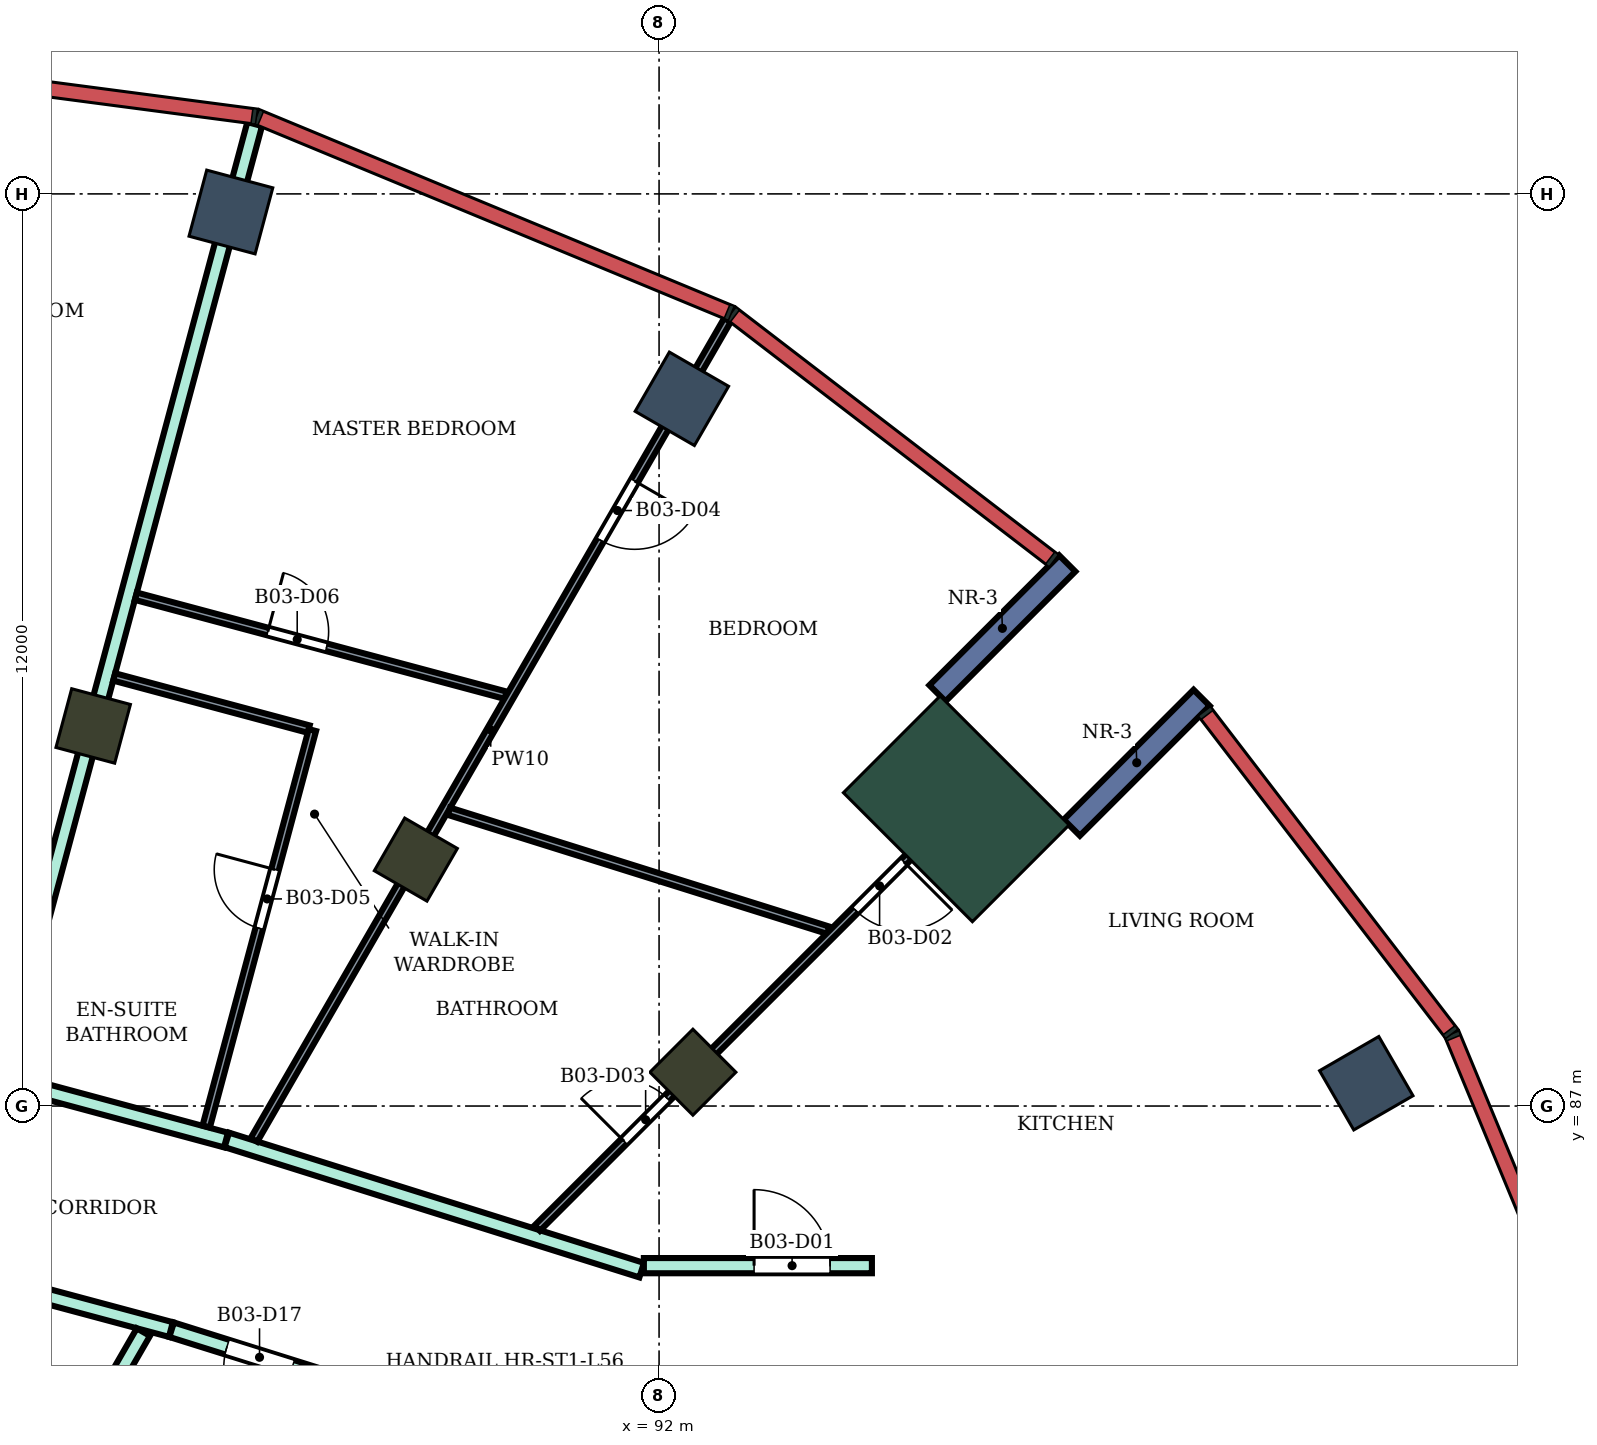
"""IFC4 building model, lengths in metres.
Left out: names, types, materials, properties, quantities, classifications, styles, units other than length and angle.
Written with IfcOpenShell. Run it as: python <this file> out.ifc"""

import sys

from ifc_helpers import new_model, si_unit, direction, frame, frame_2d, origin, origin_2d, place, context, subcontext, project, spatial, rectangle, extrude, element, fill, save


model = new_model("IFC4")
c1 = context("Model", 3, precision=1e-05, world=origin(), true_north=direction((0.0, 1.0)))
c2 = subcontext(c1, "Body", "Model", "MODEL_VIEW")
j1 = project(units=[si_unit("LENGTHUNIT", "METRE"), si_unit("PLANEANGLEUNIT", "RADIAN")], contexts=[c1])
p1 = place(None, origin())
s1 = spatial("IfcSite", under=j1, at=p1, CompositionType="ELEMENT")
p2 = place(p1, origin())
s2 = spatial("IfcBuilding", under=s1, at=p2, CompositionType="ELEMENT")
p3 = place(p2, frame((0.0, 0.0, 245.7)))
s3 = spatial("IfcBuildingStorey", under=s2, at=p3, CompositionType="ELEMENT", Elevation=245.7)
for number, where, z_axis, x_axis in (
    (1, (101.304, 87.3, 0.0), (0.0, 0.0, 1.0), (0.866, 0.5, 0.0)),
    (2, (92.3, 96.304, 0.0), (0.0, 0.0, 1.0), (0.5, 0.866, 0.0)),
    (3, (86.367, 98.762, 0.0), (0.0, 0.0, 1.0), (0.259, 0.966, 0.0)),
):
    element("IfcColumn", number, at=place(p3, frame(where, z_axis=z_axis, x_axis=x_axis)), inside=s3, PredefinedType="COLUMN", context=c2, shape_type="SweptSolid", body=[
        extrude(rectangle(XDim=0.9, YDim=0.9, at=origin_2d()), origin(), (0.0, 0.0, 1.0), 4.2),
    ])
for number, where, z_axis, x_axis in (
    (4, (92.445, 87.445, 0.0), (0.0, 0.0, 1.0), (0.707, 0.707, 0.0)),
    (5, (88.8, 90.242, 0.0), (0.0, 0.0, 1.0), (0.5, 0.866, 0.0)),
    (6, (84.555, 92.0, 0.0), (0.0, 0.0, 1.0), (0.259, 0.966, 0.0)),
):
    element("IfcColumn", number, at=place(p3, frame(where, z_axis=z_axis, x_axis=x_axis)), inside=s3, PredefinedType="COLUMN", context=c2, shape_type="SweptSolid", body=[
        extrude(rectangle(XDim=0.8, YDim=0.8, at=origin_2d()), origin(), (0.0, 0.0, 1.0), 4.2),
    ])
p4 = place(p3, frame((95.91, 90.91, 0.0), z_axis=(0.0, 0.0, 1.0), x_axis=(0.707106781187, 0.707106781187, 0.0)))
e7 = element("IfcColumn", 7, at=p4, inside=s3, PredefinedType="COLUMN", context=c2, shape_type="SweptSolid", body=[
    extrude(rectangle(XDim=1.8, YDim=2.4, at=origin_2d()), origin(), (0.0, 0.0, 1.0), 4.2),
])
for number, where, z_axis, x_axis in (
    (8, (97.43, 90.662, 0.0), (0.0, 0.0, 1.0), (0.707, 0.707, 0.0)),
    (9, (95.662, 92.43, 0.0), (0.0, 0.0, 1.0), (0.707, 0.707, 0.0)),
):
    element("IfcWall", number, at=place(p3, frame(where, z_axis=z_axis, x_axis=x_axis)), inside=s3, PredefinedType="NOTDEFINED", context=c2, shape_type="SweptSolid", body=[
        extrude(rectangle(XDim=2.416, YDim=0.3, at=frame_2d((1.208, 0.0))), origin(), (0.0, 0.0, 1.0), 4.2),
    ])
p5 = place(p3, frame((80.0, 85.554, 0.0), z_axis=(0.0, 0.0, 1.0), x_axis=(0.965928989968, -0.258807237802, 0.0)))
e10 = element("IfcWall", 10, at=p5, inside=s3, PredefinedType="PARTITIONING", context=c2, shape_type="SweptSolid", body=[
    extrude(rectangle(XDim=5.774, YDim=0.2, at=frame_2d((2.887, 0.0))), origin(), (0.0, 0.0, 1.0), 3.75),
])
p6 = place(p5, frame((2.292, 0.0, 0.0)))
e11 = element("IfcOpeningElement", 11, at=p6, cuts=e10, PredefinedType="OPENING", context=c2, shape_type="SweptSolid", body=[
    extrude(rectangle(XDim=0.9, YDim=2.1, at=frame_2d((0.45, 1.05))), frame((0.0, 0.11, 0.0), z_axis=(0.0, -1.0, 0.0), x_axis=(1.0, 0.0, 0.0)), (0.0, 0.0, 1.0), 0.22),
])
p7 = place(p3, frame((80.049, 88.237, 0.0), z_axis=(0.0, 0.0, 1.0), x_axis=(0.965582990495, -0.260095152718, 0.0)))
e12 = element("IfcWall", 12, at=p7, inside=s3, PredefinedType="PARTITIONING", context=c2, shape_type="SweptSolid", body=[
    extrude(rectangle(XDim=6.476, YDim=0.2, at=frame_2d((3.238, 0.0))), origin(), (0.0, 0.0, 1.0), 3.75),
])
p8 = place(p7, frame((0.5, 0.0, 0.0)))
e13 = element("IfcOpeningElement", 13, at=p8, cuts=e12, PredefinedType="OPENING", context=c2, shape_type="SweptSolid", body=[
    extrude(rectangle(XDim=1.0, YDim=2.1, at=frame_2d((0.5, 1.05))), frame((0.0, 0.11, 0.0), z_axis=(0.0, -1.0, 0.0), x_axis=(1.0, 0.0, 0.0)), (0.0, 0.0, 1.0), 0.22),
])
p9 = place(p3, frame((83.335, 87.456, 0.0), z_axis=(0.0, 0.0, 1.0), x_axis=(0.259184958139, 0.965827705895, 0.0)))
e14 = element("IfcWall", 14, at=p9, inside=s3, PredefinedType="PARTITIONING", context=c2, shape_type="SweptSolid", body=[
    extrude(rectangle(XDim=12.904, YDim=0.2, at=frame_2d((6.452, 0.0))), origin(), (0.0, 0.0, 1.0), 3.75),
])
p10 = place(p3, frame((83.852, 81.665, 0.0), z_axis=(0.0, 0.0, 1.0), x_axis=(0.500185068774, 0.865918527909, 0.0)))
e15 = element("IfcWall", 15, at=p10, inside=s3, PredefinedType="PARTITIONING", context=c2, shape_type="SweptSolid", body=[
    extrude(rectangle(XDim=2.726, YDim=0.2, at=frame_2d((1.363, 0.0))), origin(), (0.0, 0.0, 1.0), 3.75),
])
p11 = place(p3, frame((85.587, 84.057, 0.0), z_axis=(0.0, 0.0, 1.0), x_axis=(0.954239513179, -0.299043393987, 0.0)))
e16 = element("IfcWall", 16, at=p11, inside=s3, PredefinedType="PARTITIONING", context=c2, shape_type="SweptSolid", body=[
    extrude(rectangle(XDim=2.424, YDim=0.2, at=frame_2d((1.212, 0.0))), origin(), (0.0, 0.0, 1.0), 3.75),
])
p12 = place(p11, frame((0.762, 0.0, 0.0)))
e17 = element("IfcOpeningElement", 17, at=p12, cuts=e16, PredefinedType="OPENING", context=c2, shape_type="SweptSolid", body=[
    extrude(rectangle(XDim=0.9, YDim=2.1, at=frame_2d((0.45, 1.05))), frame((0.0, 0.11, 0.0), z_axis=(0.0, -1.0, 0.0), x_axis=(1.0, 0.0, 0.0)), (0.0, 0.0, 1.0), 0.22),
])
p13 = place(p3, frame((86.313, 86.554, 0.0), z_axis=(0.0, 0.0, 1.0), x_axis=(0.954081217458, -0.299548043717, 0.0)))
e18 = element("IfcWall", 18, at=p13, inside=s3, PredefinedType="PARTITIONING", context=c2, shape_type="SweptSolid", body=[
    extrude(rectangle(XDim=5.721, YDim=0.2, at=frame_2d((2.86, 0.0))), origin(), (0.0, 0.0, 1.0), 3.75),
])
p14 = place(p3, frame((91.8, 84.9, 0.0), z_axis=(0.0, 0.0, 1.0), x_axis=(1.0, 0.0, 0.0)))
e19 = element("IfcWall", 19, at=p14, inside=s3, PredefinedType="PARTITIONING", context=c2, shape_type="SweptSolid", body=[
    extrude(rectangle(XDim=3.0, YDim=0.2, at=frame_2d((1.5, 0.0))), origin(), (0.0, 0.0, 1.0), 3.75),
])
p15 = place(p14, frame((1.45, 0.0, 0.0)))
e20 = element("IfcOpeningElement", 20, at=p15, cuts=e19, PredefinedType="OPENING", context=c2, shape_type="SweptSolid", body=[
    extrude(rectangle(XDim=1.0, YDim=2.1, at=frame_2d((0.5, 1.05))), frame((0.0, 0.11, 0.0), z_axis=(0.0, -1.0, 0.0), x_axis=(1.0, 0.0, 0.0)), (0.0, 0.0, 1.0), 0.22),
])
p16 = place(p3, frame((84.831, 92.645, 0.0), z_axis=(0.0, 0.0, 1.0), x_axis=(0.965900745566, -0.258912629499, 0.0)))
e21 = element("IfcWall", 21, at=p16, inside=s3, PredefinedType="PARTITIONING", context=c2, shape_type="SweptSolid", body=[
    extrude(rectangle(XDim=2.65, YDim=0.1, at=frame_2d((1.325, 0.0))), origin(), (0.0, 0.0, 1.0), 3.75),
])
p17 = place(p3, frame((85.116, 93.707, 0.0), z_axis=(0.0, 0.0, 1.0), x_axis=(0.965979414561, -0.258618968068, 0.0)))
e22 = element("IfcWall", 22, at=p17, inside=s3, PredefinedType="PARTITIONING", context=c2, shape_type="SweptSolid", body=[
    extrude(rectangle(XDim=5.036, YDim=0.1, at=frame_2d((2.518, 0.0))), origin(), (0.0, 0.0, 1.0), 3.75),
])
p18 = place(p17, frame((1.798, 0.0, 0.0)))
e23 = element("IfcOpeningElement", 23, at=p18, cuts=e22, PredefinedType="OPENING", context=c2, shape_type="SweptSolid", body=[
    extrude(rectangle(XDim=0.8, YDim=2.1, at=frame_2d((0.4, 1.05))), frame((0.0, 0.06, 0.0), z_axis=(0.0, -1.0, 0.0), x_axis=(1.0, 0.0, 0.0)), (0.0, 0.0, 1.0), 0.12),
])
p19 = place(p3, frame((86.042, 86.731, 0.0), z_axis=(0.0, 0.0, 1.0), x_axis=(0.258737592043, 0.96594764789, 0.0)))
e24 = element("IfcWall", 24, at=p19, inside=s3, PredefinedType="PARTITIONING", context=c2, shape_type="SweptSolid", body=[
    extrude(rectangle(XDim=5.399, YDim=0.1, at=frame_2d((2.7, 0.0))), origin(), (0.0, 0.0, 1.0), 3.75),
])
p20 = place(p19, frame((2.7, 0.0, 0.0)))
e25 = element("IfcOpeningElement", 25, at=p20, cuts=e24, PredefinedType="OPENING", context=c2, shape_type="SweptSolid", body=[
    extrude(rectangle(XDim=0.8, YDim=2.1, at=frame_2d((0.4, 1.05))), frame((0.0, 0.06, 0.0), z_axis=(0.0, -1.0, 0.0), x_axis=(1.0, 0.0, 0.0)), (0.0, 0.0, 1.0), 0.12),
])
p21 = place(p3, frame((86.671, 86.554, 0.0), z_axis=(0.0, 0.0, 1.0), x_axis=(0.500104188531, 0.865965242151, 0.0)))
e26 = element("IfcWall", 26, at=p21, inside=s3, PredefinedType="PARTITIONING", context=c2, shape_type="SweptSolid", body=[
    extrude(rectangle(XDim=12.456, YDim=0.1, at=frame_2d((6.228, 0.0))), origin(), (0.0, 0.0, 1.0), 3.75),
])
p22 = place(p21, frame((9.111, 0.0, 0.0)))
e27 = element("IfcOpeningElement", 27, at=p22, cuts=e26, PredefinedType="OPENING", context=c2, shape_type="SweptSolid", body=[
    extrude(rectangle(XDim=0.9, YDim=2.1, at=frame_2d((0.45, 1.05))), frame((0.0, 0.06, 0.0), z_axis=(0.0, -1.0, 0.0), x_axis=(1.0, 0.0, 0.0)), (0.0, 0.0, 1.0), 0.12),
])
p23 = place(p3, frame((89.235, 90.878, 0.0), z_axis=(0.0, 0.0, 1.0), x_axis=(0.954193795587, -0.299189238548, 0.0)))
e28 = element("IfcWall", 28, at=p23, inside=s3, PredefinedType="PARTITIONING", context=c2, shape_type="SweptSolid", body=[
    extrude(rectangle(XDim=5.23, YDim=0.1, at=frame_2d((2.615, 0.0))), origin(), (0.0, 0.0, 1.0), 3.75),
])
p24 = place(p3, frame((90.396, 85.393, 0.0), z_axis=(0.0, 0.0, 1.0), x_axis=(0.707279106146, 0.706934414221, 0.0)))
e29 = element("IfcWall", 29, at=p24, inside=s3, PredefinedType="PARTITIONING", context=c2, shape_type="SweptSolid", body=[
    extrude(rectangle(XDim=8.5, YDim=0.1, at=frame_2d((4.25, 0.0))), origin(), (0.0, 0.0, 1.0), 3.75),
])
p25 = place(p24, frame((5.919, 0.0, 0.0)))
e30 = element("IfcOpeningElement", 30, at=p25, cuts=e29, PredefinedType="OPENING", context=c2, shape_type="SweptSolid", body=[
    extrude(rectangle(XDim=0.9, YDim=2.1, at=frame_2d((0.45, 1.05))), frame((0.0, 0.06, 0.0), z_axis=(0.0, -1.0, 0.0), x_axis=(1.0, 0.0, 0.0)), (0.0, 0.0, 1.0), 0.12),
])
p26 = place(p24, frame((1.617, 0.0, 0.0)))
e31 = element("IfcOpeningElement", 31, at=p26, cuts=e29, PredefinedType="OPENING", context=c2, shape_type="SweptSolid", body=[
    extrude(rectangle(XDim=0.8, YDim=2.1, at=frame_2d((0.4, 1.05))), frame((0.0, 0.06, 0.0), z_axis=(0.0, -1.0, 0.0), x_axis=(1.0, 0.0, 0.0)), (0.0, 0.0, 1.0), 0.12),
])
p27 = place(p15, origin())
e32 = element("IfcDoor", 32, at=p27, inside=s3, OperationType="SINGLE_SWING_LEFT", PredefinedType="DOOR", context=c2, shape_type="SweptSolid", body=[
    extrude(rectangle(XDim=1.0, YDim=2.1, at=frame_2d((0.5, 1.05))), frame((0.0, 0.025, 0.0), z_axis=(0.0, -1.0, 0.0), x_axis=(1.0, 0.0, 0.0)), (0.0, 0.0, 1.0), 0.05),
])
fill(e20, e32)
p28 = place(p25, frame((0.9, 0.0, 0.0), z_axis=(0.0, 0.0, 1.0), x_axis=(-1.0, 0.0, 0.0)))
e33 = element("IfcDoor", 33, at=p28, inside=s3, OperationType="SINGLE_SWING_LEFT", PredefinedType="DOOR", context=c2, shape_type="SweptSolid", body=[
    extrude(rectangle(XDim=0.9, YDim=2.1, at=frame_2d((0.45, 1.05))), frame((0.0, 0.025, 0.0), z_axis=(0.0, -1.0, 0.0), x_axis=(1.0, 0.0, 0.0)), (0.0, 0.0, 1.0), 0.05),
])
fill(e30, e33)
p29 = place(p26, origin())
e34 = element("IfcDoor", 34, at=p29, inside=s3, OperationType="SINGLE_SWING_LEFT", PredefinedType="DOOR", context=c2, shape_type="SweptSolid", body=[
    extrude(rectangle(XDim=0.8, YDim=2.1, at=frame_2d((0.4, 1.05))), frame((0.0, 0.025, 0.0), z_axis=(0.0, -1.0, 0.0), x_axis=(1.0, 0.0, 0.0)), (0.0, 0.0, 1.0), 0.05),
])
fill(e31, e34)
p30 = place(p22, frame((0.9, 0.0, 0.0), z_axis=(0.0, 0.0, 1.0), x_axis=(-1.0, 0.0, 0.0)))
e35 = element("IfcDoor", 35, at=p30, inside=s3, OperationType="SINGLE_SWING_LEFT", PredefinedType="DOOR", context=c2, shape_type="SweptSolid", body=[
    extrude(rectangle(XDim=0.9, YDim=2.1, at=frame_2d((0.45, 1.05))), frame((0.0, 0.025, 0.0), z_axis=(0.0, -1.0, 0.0), x_axis=(1.0, 0.0, 0.0)), (0.0, 0.0, 1.0), 0.05),
])
fill(e27, e35)
p31 = place(p20, origin())
e36 = element("IfcDoor", 36, at=p31, inside=s3, OperationType="SINGLE_SWING_RIGHT", PredefinedType="DOOR", context=c2, shape_type="SweptSolid", body=[
    extrude(rectangle(XDim=0.8, YDim=2.1, at=frame_2d((0.4, 1.05))), frame((0.0, 0.025, 0.0), z_axis=(0.0, -1.0, 0.0), x_axis=(1.0, 0.0, 0.0)), (0.0, 0.0, 1.0), 0.05),
])
fill(e25, e36)
p32 = place(p18, origin())
e37 = element("IfcDoor", 37, at=p32, inside=s3, OperationType="SINGLE_SWING_LEFT", PredefinedType="DOOR", context=c2, shape_type="SweptSolid", body=[
    extrude(rectangle(XDim=0.8, YDim=2.1, at=frame_2d((0.4, 1.05))), frame((0.0, 0.025, 0.0), z_axis=(0.0, -1.0, 0.0), x_axis=(1.0, 0.0, 0.0)), (0.0, 0.0, 1.0), 0.05),
])
fill(e23, e37)
p33 = place(p12, frame((0.9, 0.0, 0.0), z_axis=(0.0, 0.0, 1.0), x_axis=(-1.0, 0.0, 0.0)))
e38 = element("IfcDoor", 38, at=p33, inside=s3, OperationType="SINGLE_SWING_LEFT", PredefinedType="DOOR", context=c2, shape_type="SweptSolid", body=[
    extrude(rectangle(XDim=0.9, YDim=2.1, at=frame_2d((0.45, 1.05))), frame((0.0, 0.025, 0.0), z_axis=(0.0, -1.0, 0.0), x_axis=(1.0, 0.0, 0.0)), (0.0, 0.0, 1.0), 0.05),
])
fill(e17, e38)
save(model, sys.argv[1])
